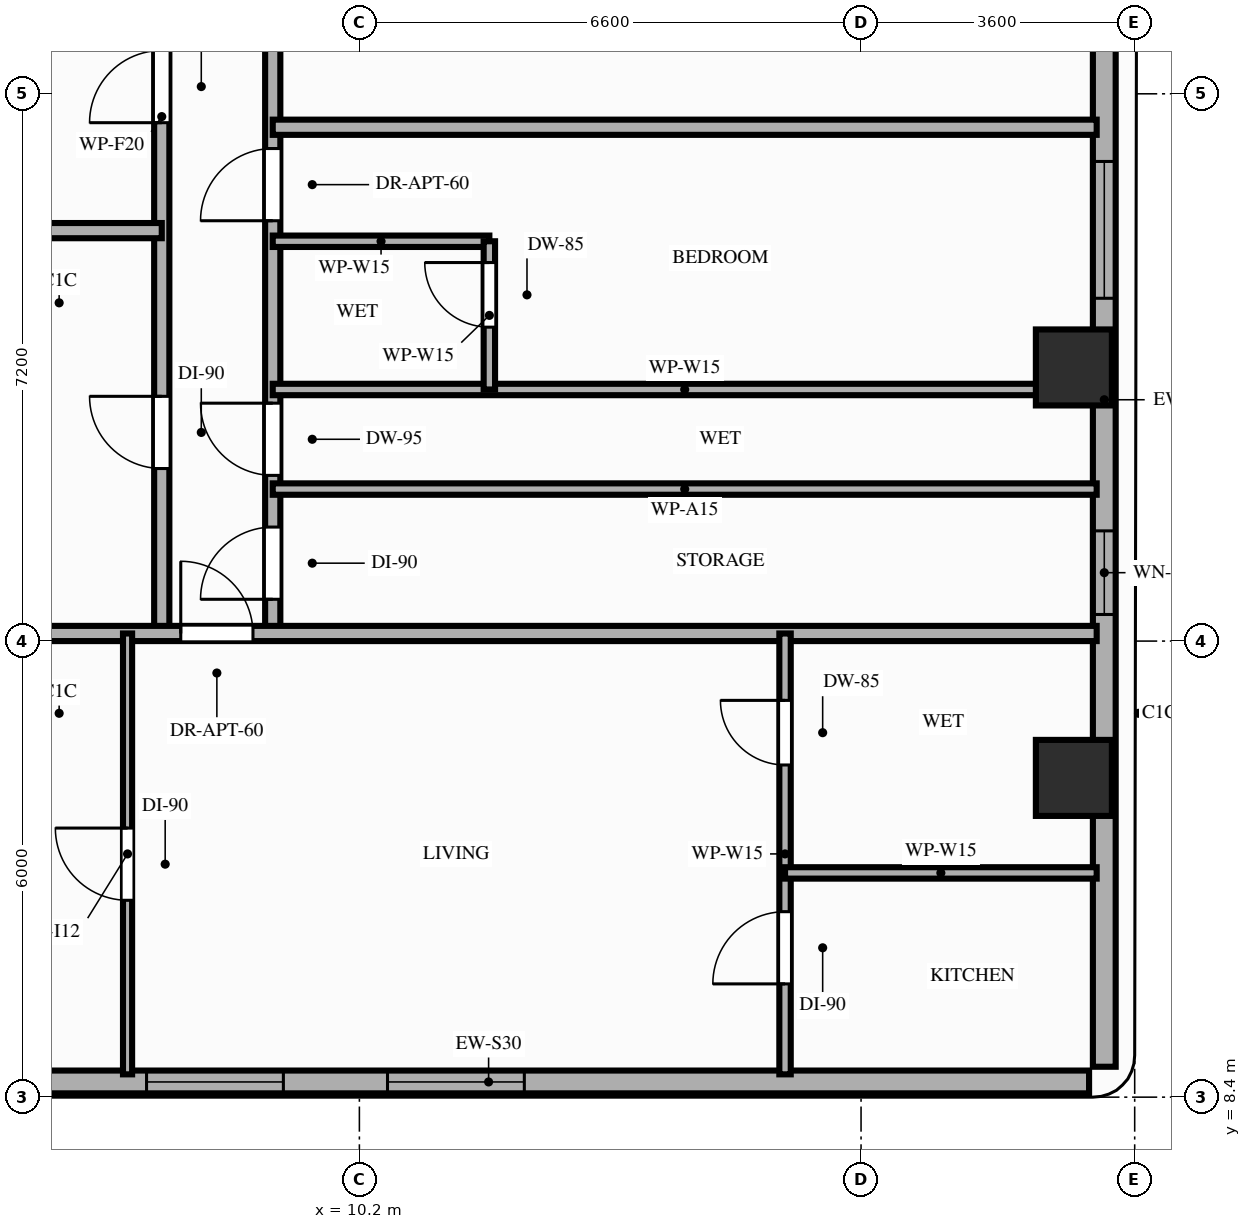
"""IFC4 building model, lengths in metres.
Left out: names, types, materials, properties, quantities, classifications, styles, units other than length and angle.
Written with IfcOpenShell. Run it as: python <this file> out.ifc"""

import sys

from ifc_helpers import new_model, si_unit, direction, frame, frame_2d, origin, origin_2d, place, context, subcontext, project, spatial, rectangle, extrude, element, fill, save


model = new_model("IFC4")
c1 = context("Model", 3, precision=1e-05, world=origin(), true_north=direction((0.0, 1.0)))
c2 = subcontext(c1, "Body", "Model", "MODEL_VIEW")
j1 = project(units=[si_unit("LENGTHUNIT", "METRE"), si_unit("PLANEANGLEUNIT", "RADIAN")], contexts=[c1])
p1 = place(None, origin())
s1 = spatial("IfcSite", under=j1, at=p1, CompositionType="ELEMENT")
p2 = place(p1, origin())
s2 = spatial("IfcBuilding", under=s1, at=p2, CompositionType="ELEMENT")
p3 = place(p2, frame((0.0, 0.0, 139.4)))
s3 = spatial("IfcBuildingStorey", under=s2, at=p3, CompositionType="ELEMENT", Elevation=139.4)
for number, where, z_axis, x_axis in (
    (1, (19.6, 12.6, 0.0), (0.0, 0.0, 1.0), (1.0, 0.0, 0.0)),
    (2, (19.6, 18.0, 0.0), (0.0, 0.0, 1.0), (1.0, 0.0, 0.0)),
):
    element("IfcColumn", number, at=place(p3, frame(where, z_axis=z_axis, x_axis=x_axis)), inside=s3, PredefinedType="COLUMN", context=c2, shape_type="SweptSolid", body=[
        extrude(rectangle(XDim=1.0, YDim=1.0, at=origin_2d()), origin(), (0.0, 0.0, 1.0), 3.2),
    ])
p4 = place(p3, frame((4.0, 8.6, 0.0), z_axis=(0.0, 0.0, 1.0), x_axis=(1.0, 0.0, 0.0)))
e3 = element("IfcWall", 3, at=p4, inside=s3, PredefinedType="STANDARD", context=c2, shape_type="SweptSolid", body=[
    extrude(rectangle(XDim=15.8, YDim=0.3, at=frame_2d((7.9, 0.0))), origin(), (0.0, 0.0, 1.0), 3.02),
])
p5 = place(p4, frame((6.57, 0.0, 0.85)))
e4 = element("IfcOpeningElement", 4, at=p5, cuts=e3, PredefinedType="OPENING", context=c2, shape_type="SweptSolid", body=[
    extrude(rectangle(XDim=1.8, YDim=1.75, at=frame_2d((0.9, 0.875))), frame((0.0, 0.16, 0.0), z_axis=(0.0, -1.0, 0.0), x_axis=(1.0, 0.0, 0.0)), (0.0, 0.0, 1.0), 0.32),
])
p6 = place(p4, frame((3.4, 0.0, 0.85)))
e5 = element("IfcOpeningElement", 5, at=p6, cuts=e3, PredefinedType="OPENING", context=c2, shape_type="SweptSolid", body=[
    extrude(rectangle(XDim=1.8, YDim=1.75, at=frame_2d((0.9, 0.875))), frame((0.0, 0.16, 0.0), z_axis=(0.0, -1.0, 0.0), x_axis=(1.0, 0.0, 0.0)), (0.0, 0.0, 1.0), 0.32),
])
p7 = place(p3, frame((20.0, 8.8, 0.0), z_axis=(0.0, 0.0, 1.0), x_axis=(0.0, 1.0, 0.0)))
e6 = element("IfcWall", 6, at=p7, inside=s3, PredefinedType="STANDARD", context=c2, shape_type="SweptSolid", body=[
    extrude(rectangle(XDim=17.55, YDim=0.3, at=frame_2d((8.775, 0.0))), origin(), (0.0, 0.0, 1.0), 2.45),
])
p8 = place(p7, frame((10.11, 0.0, 0.85)))
e7 = element("IfcOpeningElement", 7, at=p8, cuts=e6, PredefinedType="OPENING", context=c2, shape_type="SweptSolid", body=[
    extrude(rectangle(XDim=1.8, YDim=1.35, at=frame_2d((0.9, 0.675))), frame((0.0, 0.16, 0.0), z_axis=(0.0, -1.0, 0.0), x_axis=(1.0, 0.0, 0.0)), (0.0, 0.0, 1.0), 0.32),
])
p9 = place(p7, frame((5.95, 0.0, 0.85)))
e8 = element("IfcOpeningElement", 8, at=p9, cuts=e6, PredefinedType="OPENING", context=c2, shape_type="SweptSolid", body=[
    extrude(rectangle(XDim=1.1, YDim=1.35, at=frame_2d((0.55, 0.675))), frame((0.0, 0.16, 0.0), z_axis=(0.0, -1.0, 0.0), x_axis=(1.0, 0.0, 0.0)), (0.0, 0.0, 1.0), 0.32),
])
p10 = place(p3, frame((7.6, 14.5, 0.0), z_axis=(0.0, 0.0, 1.0), x_axis=(0.0, 1.0, 0.0)))
e9 = element("IfcWall", 9, at=p10, inside=s3, PredefinedType="PARTITIONING", context=c2, shape_type="SweptSolid", body=[
    extrude(rectangle(XDim=13.6, YDim=0.2, at=frame_2d((6.8, 0.0))), origin(), (0.0, 0.0, 1.0), 2.45),
])
p11 = place(p10, frame((2.17, 0.0, 0.0)))
e10 = element("IfcOpeningElement", 10, at=p11, cuts=e9, PredefinedType="OPENING", context=c2, shape_type="SweptSolid", body=[
    extrude(rectangle(XDim=0.95, YDim=2.15, at=frame_2d((0.475, 1.075))), frame((0.0, 0.11, 0.0), z_axis=(0.0, -1.0, 0.0), x_axis=(1.0, 0.0, 0.0)), (0.0, 0.0, 1.0), 0.22),
])
p12 = place(p10, frame((6.72, 0.0, 0.0)))
e11 = element("IfcOpeningElement", 11, at=p12, cuts=e9, PredefinedType="OPENING", context=c2, shape_type="SweptSolid", body=[
    extrude(rectangle(XDim=0.95, YDim=2.15, at=frame_2d((0.475, 1.075))), frame((0.0, 0.11, 0.0), z_axis=(0.0, -1.0, 0.0), x_axis=(1.0, 0.0, 0.0)), (0.0, 0.0, 1.0), 0.22),
])
p13 = place(p10, frame((10.88, 0.0, 0.0)))
e12 = element("IfcOpeningElement", 12, at=p13, cuts=e9, PredefinedType="OPENING", context=c2, shape_type="SweptSolid", body=[
    extrude(rectangle(XDim=0.95, YDim=2.15, at=frame_2d((0.475, 1.075))), frame((0.0, 0.11, 0.0), z_axis=(0.0, -1.0, 0.0), x_axis=(1.0, 0.0, 0.0)), (0.0, 0.0, 1.0), 0.22),
])
p14 = place(p3, frame((9.06, 14.5, 0.0), z_axis=(0.0, 0.0, 1.0), x_axis=(0.0, 1.0, 0.0)))
e13 = element("IfcWall", 13, at=p14, inside=s3, PredefinedType="PARTITIONING", context=c2, shape_type="SweptSolid", body=[
    extrude(rectangle(XDim=13.6, YDim=0.2, at=frame_2d((6.8, 0.0))), origin(), (0.0, 0.0, 1.0), 2.45),
])
p15 = place(p14, frame((0.45, 0.0, 0.0)))
e14 = element("IfcOpeningElement", 14, at=p15, cuts=e13, PredefinedType="OPENING", context=c2, shape_type="SweptSolid", body=[
    extrude(rectangle(XDim=0.95, YDim=2.15, at=frame_2d((0.475, 1.075))), frame((0.0, 0.11, 0.0), z_axis=(0.0, -1.0, 0.0), x_axis=(1.0, 0.0, 0.0)), (0.0, 0.0, 1.0), 0.22),
])
p16 = place(p14, frame((2.08, 0.0, 0.0)))
e15 = element("IfcOpeningElement", 15, at=p16, cuts=e13, PredefinedType="OPENING", context=c2, shape_type="SweptSolid", body=[
    extrude(rectangle(XDim=0.95, YDim=2.1, at=frame_2d((0.475, 1.05))), frame((0.0, 0.11, 0.0), z_axis=(0.0, -1.0, 0.0), x_axis=(1.0, 0.0, 0.0)), (0.0, 0.0, 1.0), 0.22),
])
p17 = place(p14, frame((9.65, 0.0, 0.0)))
e16 = element("IfcOpeningElement", 16, at=p17, cuts=e13, PredefinedType="OPENING", context=c2, shape_type="SweptSolid", body=[
    extrude(rectangle(XDim=0.95, YDim=2.15, at=frame_2d((0.475, 1.075))), frame((0.0, 0.11, 0.0), z_axis=(0.0, -1.0, 0.0), x_axis=(1.0, 0.0, 0.0)), (0.0, 0.0, 1.0), 0.22),
])
p18 = place(p14, frame((5.43, 0.0, 0.0)))
e17 = element("IfcOpeningElement", 17, at=p18, cuts=e13, PredefinedType="OPENING", context=c2, shape_type="SweptSolid", body=[
    extrude(rectangle(XDim=0.95, YDim=2.15, at=frame_2d((0.475, 1.075))), frame((0.0, 0.11, 0.0), z_axis=(0.0, -1.0, 0.0), x_axis=(1.0, 0.0, 0.0)), (0.0, 0.0, 1.0), 0.22),
])
p19 = place(p3, frame((3.9, 14.5, 0.0), z_axis=(0.0, 0.0, 1.0), x_axis=(1.0, 0.0, 0.0)))
e18 = element("IfcWall", 18, at=p19, inside=s3, PredefinedType="PARTITIONING", context=c2, shape_type="SweptSolid", body=[
    extrude(rectangle(XDim=16.0, YDim=0.2, at=frame_2d((8.0, 0.0))), origin(), (0.0, 0.0, 1.0), 2.45),
])
p20 = place(p19, frame((3.95, 0.0, 0.0)))
e19 = element("IfcOpeningElement", 19, at=p20, cuts=e18, PredefinedType="OPENING", context=c2, shape_type="SweptSolid", body=[
    extrude(rectangle(XDim=0.95, YDim=2.15, at=frame_2d((0.475, 1.075))), frame((0.0, 0.11, 0.0), z_axis=(0.0, -1.0, 0.0), x_axis=(1.0, 0.0, 0.0)), (0.0, 0.0, 1.0), 0.22),
])
p21 = place(p3, frame((3.9, 19.8, 0.0), z_axis=(0.0, 0.0, 1.0), x_axis=(1.0, 0.0, 0.0)))
e20 = element("IfcWall", 20, at=p21, inside=s3, PredefinedType="PARTITIONING", context=c2, shape_type="SweptSolid", body=[
    extrude(rectangle(XDim=3.7, YDim=0.2, at=frame_2d((1.85, 0.0))), origin(), (0.0, 0.0, 1.0), 2.45),
])
p22 = place(p3, frame((7.15, 8.7, 0.0), z_axis=(0.0, 0.0, 1.0), x_axis=(0.0, 1.0, 0.0)))
e21 = element("IfcWall", 21, at=p22, inside=s3, PredefinedType="PARTITIONING", context=c2, shape_type="SweptSolid", body=[
    extrude(rectangle(XDim=5.8, YDim=0.12, at=frame_2d((2.9, 0.0))), origin(), (0.0, 0.0, 1.0), 2.45),
])
p23 = place(p22, frame((2.29, 0.0, 0.0)))
e22 = element("IfcOpeningElement", 22, at=p23, cuts=e21, PredefinedType="OPENING", context=c2, shape_type="SweptSolid", body=[
    extrude(rectangle(XDim=0.95, YDim=2.15, at=frame_2d((0.475, 1.075))), frame((0.0, 0.07, 0.0), z_axis=(0.0, -1.0, 0.0), x_axis=(1.0, 0.0, 0.0)), (0.0, 0.0, 1.0), 0.14),
])
p24 = place(p3, frame((15.8, 8.7, 0.0), z_axis=(0.0, 0.0, 1.0), x_axis=(0.0, 1.0, 0.0)))
e23 = element("IfcWall", 23, at=p24, inside=s3, PredefinedType="PARTITIONING", context=c2, shape_type="SweptSolid", body=[
    extrude(rectangle(XDim=5.8, YDim=0.15, at=frame_2d((2.9, 0.0))), origin(), (0.0, 0.0, 1.0), 2.45),
])
p25 = place(p24, frame((1.19, 0.0, 0.0)))
e24 = element("IfcOpeningElement", 24, at=p25, cuts=e23, PredefinedType="OPENING", context=c2, shape_type="SweptSolid", body=[
    extrude(rectangle(XDim=0.95, YDim=2.15, at=frame_2d((0.475, 1.075))), frame((0.0, 0.085, 0.0), z_axis=(0.0, -1.0, 0.0), x_axis=(1.0, 0.0, 0.0)), (0.0, 0.0, 1.0), 0.17),
])
p26 = place(p24, frame((4.07, 0.0, 0.0)))
e25 = element("IfcOpeningElement", 25, at=p26, cuts=e23, PredefinedType="OPENING", context=c2, shape_type="SweptSolid", body=[
    extrude(rectangle(XDim=0.85, YDim=2.1, at=frame_2d((0.425, 1.05))), frame((0.0, 0.085, 0.0), z_axis=(0.0, -1.0, 0.0), x_axis=(1.0, 0.0, 0.0)), (0.0, 0.0, 1.0), 0.17),
])
p27 = place(p3, frame((15.8, 11.35, 0.0), z_axis=(0.0, 0.0, 1.0), x_axis=(1.0, 0.0, 0.0)))
e26 = element("IfcWall", 26, at=p27, inside=s3, PredefinedType="PARTITIONING", context=c2, shape_type="SweptSolid", body=[
    extrude(rectangle(XDim=4.1, YDim=0.15, at=frame_2d((2.05, 0.0))), origin(), (0.0, 0.0, 1.0), 3.02),
])
for number, where, z_axis, x_axis in (
    (27, (9.06, 16.4, 0.0), (0.0, 0.0, 1.0), (1.0, 0.0, 0.0)),
    (28, (9.06, 17.71, 0.0), (0.0, 0.0, 1.0), (1.0, 0.0, 0.0)),
):
    element("IfcWall", number, at=place(p3, frame(where, z_axis=z_axis, x_axis=x_axis)), inside=s3, PredefinedType="PARTITIONING", context=c2, shape_type="SweptSolid", body=[
        extrude(rectangle(XDim=10.84, YDim=0.15, at=frame_2d((5.42, 0.0))), origin(), (0.0, 0.0, 1.0), 2.45),
    ])
p28 = place(p3, frame((9.06, 21.16, 0.0), z_axis=(0.0, 0.0, 1.0), x_axis=(1.0, 0.0, 0.0)))
e29 = element("IfcWall", 29, at=p28, inside=s3, PredefinedType="PARTITIONING", context=c2, shape_type="SweptSolid", body=[
    extrude(rectangle(XDim=10.84, YDim=0.2, at=frame_2d((5.42, 0.0))), origin(), (0.0, 0.0, 1.0), 2.45),
])
p29 = place(p3, frame((9.06, 19.66, 0.0), z_axis=(0.0, 0.0, 1.0), x_axis=(1.0, 0.0, 0.0)))
e30 = element("IfcWall", 30, at=p29, inside=s3, PredefinedType="PARTITIONING", context=c2, shape_type="SweptSolid", body=[
    extrude(rectangle(XDim=2.85, YDim=0.15, at=frame_2d((1.425, 0.0))), origin(), (0.0, 0.0, 1.0), 2.61),
])
p30 = place(p3, frame((11.91, 17.71, 0.0), z_axis=(0.0, 0.0, 1.0), x_axis=(0.0, 1.0, 0.0)))
e31 = element("IfcWall", 31, at=p30, inside=s3, PredefinedType="PARTITIONING", context=c2, shape_type="SweptSolid", body=[
    extrude(rectangle(XDim=1.95, YDim=0.15, at=frame_2d((0.975, 0.0))), origin(), (0.0, 0.0, 1.0), 2.45),
])
p31 = place(p30, frame((0.82, 0.0, 0.0)))
e32 = element("IfcOpeningElement", 32, at=p31, cuts=e31, PredefinedType="OPENING", context=c2, shape_type="SweptSolid", body=[
    extrude(rectangle(XDim=0.85, YDim=2.1, at=frame_2d((0.425, 1.05))), frame((0.0, 0.085, 0.0), z_axis=(0.0, -1.0, 0.0), x_axis=(1.0, 0.0, 0.0)), (0.0, 0.0, 1.0), 0.17),
])
p32 = place(p5, origin())
e33 = element("IfcWindow", 33, at=p32, inside=s3, PartitioningType="SINGLE_PANEL", PredefinedType="WINDOW", context=c2, shape_type="SweptSolid", body=[
    extrude(rectangle(XDim=1.8, YDim=1.75, at=frame_2d((0.9, 0.875))), frame((0.0, 0.03, 0.0), z_axis=(0.0, -1.0, 0.0), x_axis=(1.0, 0.0, 0.0)), (0.0, 0.0, 1.0), 0.06),
])
fill(e4, e33)
p33 = place(p8, origin())
e34 = element("IfcWindow", 34, at=p33, inside=s3, PartitioningType="SINGLE_PANEL", PredefinedType="WINDOW", context=c2, shape_type="SweptSolid", body=[
    extrude(rectangle(XDim=1.8, YDim=1.35, at=frame_2d((0.9, 0.675))), frame((0.0, 0.03, 0.0), z_axis=(0.0, -1.0, 0.0), x_axis=(1.0, 0.0, 0.0)), (0.0, 0.0, 1.0), 0.06),
])
fill(e7, e34)
p34 = place(p9, origin())
e35 = element("IfcWindow", 35, at=p34, inside=s3, PartitioningType="SINGLE_PANEL", PredefinedType="WINDOW", context=c2, shape_type="SweptSolid", body=[
    extrude(rectangle(XDim=1.1, YDim=1.35, at=frame_2d((0.55, 0.675))), frame((0.0, 0.03, 0.0), z_axis=(0.0, -1.0, 0.0), x_axis=(1.0, 0.0, 0.0)), (0.0, 0.0, 1.0), 0.06),
])
fill(e8, e35)
p35 = place(p6, origin())
e36 = element("IfcWindow", 36, at=p35, inside=s3, PartitioningType="SINGLE_PANEL", PredefinedType="WINDOW", context=c2, shape_type="SweptSolid", body=[
    extrude(rectangle(XDim=1.8, YDim=1.75, at=frame_2d((0.9, 0.875))), frame((0.0, 0.03, 0.0), z_axis=(0.0, -1.0, 0.0), x_axis=(1.0, 0.0, 0.0)), (0.0, 0.0, 1.0), 0.06),
])
fill(e5, e36)
p36 = place(p11, origin())
e37 = element("IfcDoor", 37, at=p36, inside=s3, OperationType="SINGLE_SWING_RIGHT", PredefinedType="DOOR", context=c2, shape_type="SweptSolid", body=[
    extrude(rectangle(XDim=0.95, YDim=2.15, at=frame_2d((0.475, 1.075))), frame((0.0, 0.025, 0.0), z_axis=(0.0, -1.0, 0.0), x_axis=(1.0, 0.0, 0.0)), (0.0, 0.0, 1.0), 0.05),
])
fill(e10, e37)
p37 = place(p12, origin())
e38 = element("IfcDoor", 38, at=p37, inside=s3, OperationType="SINGLE_SWING_LEFT", PredefinedType="DOOR", context=c2, shape_type="SweptSolid", body=[
    extrude(rectangle(XDim=0.95, YDim=2.15, at=frame_2d((0.475, 1.075))), frame((0.0, 0.025, 0.0), z_axis=(0.0, -1.0, 0.0), x_axis=(1.0, 0.0, 0.0)), (0.0, 0.0, 1.0), 0.05),
])
fill(e11, e38)
p38 = place(p20, origin())
e39 = element("IfcDoor", 39, at=p38, inside=s3, OperationType="SINGLE_SWING_LEFT", PredefinedType="DOOR", context=c2, shape_type="SweptSolid", body=[
    extrude(rectangle(XDim=0.95, YDim=2.15, at=frame_2d((0.475, 1.075))), frame((0.0, 0.025, 0.0), z_axis=(0.0, -1.0, 0.0), x_axis=(1.0, 0.0, 0.0)), (0.0, 0.0, 1.0), 0.05),
])
fill(e19, e39)
p39 = place(p23, origin())
e40 = element("IfcDoor", 40, at=p39, inside=s3, OperationType="SINGLE_SWING_RIGHT", PredefinedType="DOOR", context=c2, shape_type="SweptSolid", body=[
    extrude(rectangle(XDim=0.95, YDim=2.15, at=frame_2d((0.475, 1.075))), frame((0.0, 0.025, 0.0), z_axis=(0.0, -1.0, 0.0), x_axis=(1.0, 0.0, 0.0)), (0.0, 0.0, 1.0), 0.05),
])
fill(e22, e40)
p40 = place(p25, origin())
e41 = element("IfcDoor", 41, at=p40, inside=s3, OperationType="SINGLE_SWING_LEFT", PredefinedType="DOOR", context=c2, shape_type="SweptSolid", body=[
    extrude(rectangle(XDim=0.95, YDim=2.15, at=frame_2d((0.475, 1.075))), frame((0.0, 0.025, 0.0), z_axis=(0.0, -1.0, 0.0), x_axis=(1.0, 0.0, 0.0)), (0.0, 0.0, 1.0), 0.05),
])
fill(e24, e41)
p41 = place(p26, origin())
e42 = element("IfcDoor", 42, at=p41, inside=s3, OperationType="SINGLE_SWING_RIGHT", PredefinedType="DOOR", context=c2, shape_type="SweptSolid", body=[
    extrude(rectangle(XDim=0.85, YDim=2.1, at=frame_2d((0.425, 1.05))), frame((0.0, 0.025, 0.0), z_axis=(0.0, -1.0, 0.0), x_axis=(1.0, 0.0, 0.0)), (0.0, 0.0, 1.0), 0.05),
])
fill(e25, e42)
p42 = place(p15, origin())
e43 = element("IfcDoor", 43, at=p42, inside=s3, OperationType="SINGLE_SWING_LEFT", PredefinedType="DOOR", context=c2, shape_type="SweptSolid", body=[
    extrude(rectangle(XDim=0.95, YDim=2.15, at=frame_2d((0.475, 1.075))), frame((0.0, 0.025, 0.0), z_axis=(0.0, -1.0, 0.0), x_axis=(1.0, 0.0, 0.0)), (0.0, 0.0, 1.0), 0.05),
])
fill(e14, e43)
p43 = place(p16, origin())
e44 = element("IfcDoor", 44, at=p43, inside=s3, OperationType="SINGLE_SWING_RIGHT", PredefinedType="DOOR", context=c2, shape_type="SweptSolid", body=[
    extrude(rectangle(XDim=0.95, YDim=2.1, at=frame_2d((0.475, 1.05))), frame((0.0, 0.025, 0.0), z_axis=(0.0, -1.0, 0.0), x_axis=(1.0, 0.0, 0.0)), (0.0, 0.0, 1.0), 0.05),
])
fill(e15, e44)
p44 = place(p31, origin())
e45 = element("IfcDoor", 45, at=p44, inside=s3, OperationType="SINGLE_SWING_RIGHT", PredefinedType="DOOR", context=c2, shape_type="SweptSolid", body=[
    extrude(rectangle(XDim=0.85, YDim=2.1, at=frame_2d((0.425, 1.05))), frame((0.0, 0.025, 0.0), z_axis=(0.0, -1.0, 0.0), x_axis=(1.0, 0.0, 0.0)), (0.0, 0.0, 1.0), 0.05),
])
fill(e32, e45)
p45 = place(p18, origin())
e46 = element("IfcDoor", 46, at=p45, inside=s3, OperationType="SINGLE_SWING_LEFT", PredefinedType="DOOR", context=c2, shape_type="SweptSolid", body=[
    extrude(rectangle(XDim=0.95, YDim=2.15, at=frame_2d((0.475, 1.075))), frame((0.0, 0.025, 0.0), z_axis=(0.0, -1.0, 0.0), x_axis=(1.0, 0.0, 0.0)), (0.0, 0.0, 1.0), 0.05),
])
fill(e17, e46)
save(model, sys.argv[1])
